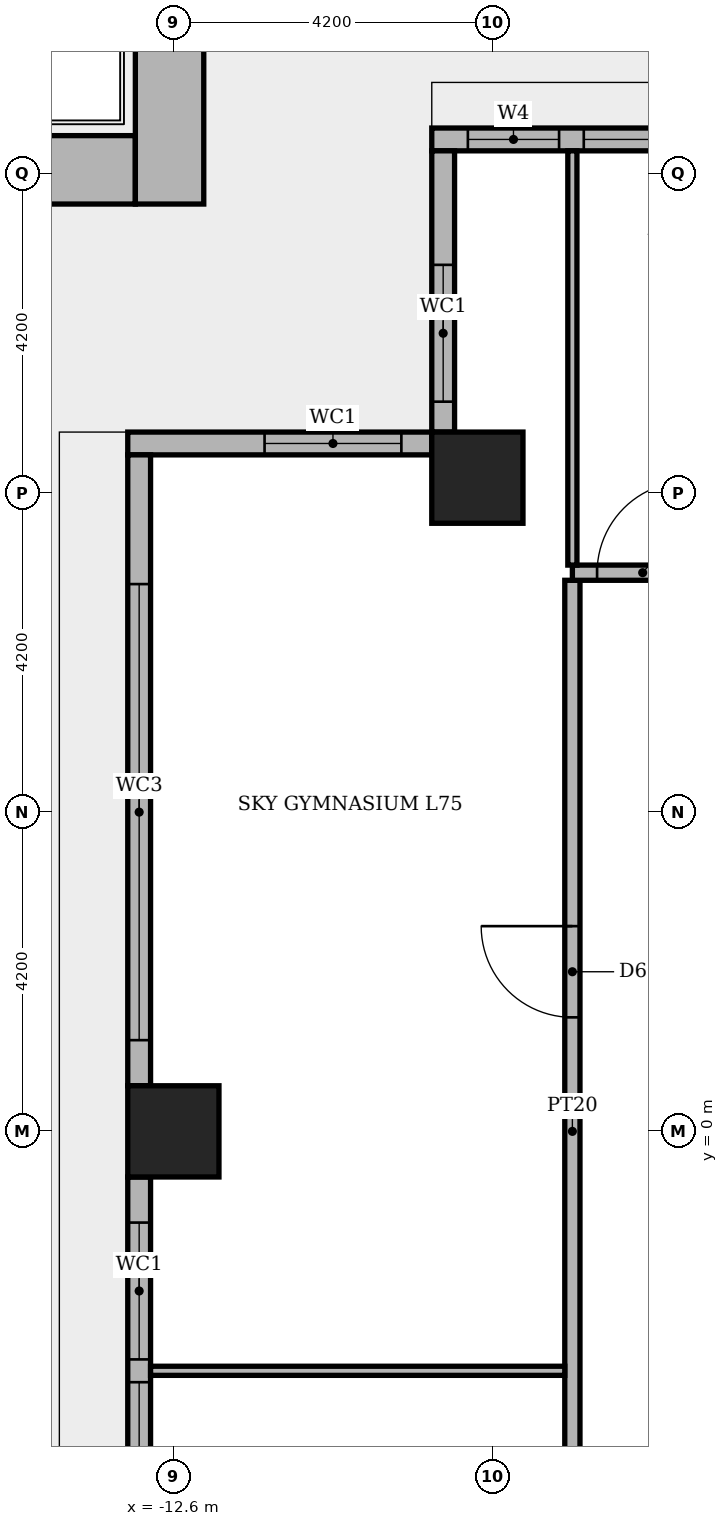
"""IFC4 building model, lengths in metres.
Left out: names, types, materials, properties, quantities, classifications, styles, units other than length and angle.
Written with IfcOpenShell. Run it as: python <this file> out.ifc"""

import sys

from ifc_helpers import new_model, si_unit, direction, frame, frame_2d, origin, origin_2d, place, context, subcontext, project, spatial, rectangle, extrude, element, fill, save


model = new_model("IFC4")
c1 = context("Model", 3, precision=1e-05, world=origin(), true_north=direction((0.0, 1.0)))
c2 = subcontext(c1, "Body", "Model", "MODEL_VIEW")
j1 = project(units=[si_unit("LENGTHUNIT", "METRE"), si_unit("PLANEANGLEUNIT", "RADIAN")], contexts=[c1])
p1 = place(None, origin())
s1 = spatial("IfcSite", under=j1, at=p1, CompositionType="ELEMENT")
p2 = place(p1, origin())
s2 = spatial("IfcBuilding", under=s1, at=p2, CompositionType="ELEMENT")
p3 = place(p2, frame((0.0, 0.0, 312.3)))
s3 = spatial("IfcBuildingStorey", under=s2, at=p3, CompositionType="ELEMENT", Elevation=312.3)
for number, where, z_axis, x_axis in (
    (1, (-12.6, 0.0, -0.35), (0.0, 0.0, 1.0), (1.0, 0.0, 0.0)),
    (2, (-8.6, 8.6, -0.35), (0.0, 0.0, 1.0), (1.0, 0.0, 0.0)),
):
    element("IfcColumn", number, at=place(p3, frame(where, z_axis=z_axis, x_axis=x_axis)), inside=s3, PredefinedType="COLUMN", context=c2, shape_type="SweptSolid", body=[
        extrude(rectangle(XDim=1.2, YDim=1.2, at=origin_2d()), origin(), (0.0, 0.0, 1.0), 4.25),
    ])
p4 = place(p3, frame((-0.6, 13.05, 0.0), z_axis=(0.0, 0.0, 1.0), x_axis=(-1.0, 0.0, 0.0)))
e3 = element("IfcWall", 3, at=p4, inside=s3, PredefinedType="STANDARD", context=c2, shape_type="SweptSolid", body=[
    extrude(rectangle(XDim=8.6, YDim=0.3, at=frame_2d((4.3, 0.0))), origin(), (0.0, 0.0, 1.0), 3.55),
])
p5 = place(p4, frame((0.6, 0.0, 0.6)))
e4 = element("IfcOpeningElement", 4, at=p5, cuts=e3, PredefinedType="OPENING", context=c2, shape_type="SweptSolid", body=[
    extrude(rectangle(XDim=1.8, YDim=2.4, at=frame_2d((0.9, 1.2))), frame((0.0, 0.16, 0.0), z_axis=(0.0, -1.0, 0.0), x_axis=(1.0, 0.0, 0.0)), (0.0, 0.0, 1.0), 0.32),
])
p6 = place(p4, frame((2.7, 0.0, 0.6)))
e5 = element("IfcOpeningElement", 5, at=p6, cuts=e3, PredefinedType="OPENING", context=c2, shape_type="SweptSolid", body=[
    extrude(rectangle(XDim=3.9, YDim=2.4, at=frame_2d((1.95, 1.2))), frame((0.0, 0.16, 0.0), z_axis=(0.0, -1.0, 0.0), x_axis=(1.0, 0.0, 0.0)), (0.0, 0.0, 1.0), 0.32),
])
p7 = place(p4, frame((6.925, 0.0, 0.9)))
e6 = element("IfcOpeningElement", 6, at=p7, cuts=e3, PredefinedType="OPENING", context=c2, shape_type="SweptSolid", body=[
    extrude(rectangle(XDim=1.2, YDim=2.1, at=frame_2d((0.6, 1.05))), frame((0.0, 0.16, 0.0), z_axis=(0.0, -1.0, 0.0), x_axis=(1.0, 0.0, 0.0)), (0.0, 0.0, 1.0), 0.32),
])
p8 = place(p3, frame((-9.05, 12.9, 0.0), z_axis=(0.0, 0.0, 1.0), x_axis=(0.0, -1.0, 0.0)))
e7 = element("IfcWall", 7, at=p8, inside=s3, PredefinedType="STANDARD", context=c2, shape_type="SweptSolid", body=[
    extrude(rectangle(XDim=3.7, YDim=0.3, at=frame_2d((1.85, 0.0))), origin(), (0.0, 0.0, 1.0), 3.55),
])
p9 = place(p8, frame((1.5, 0.0, 0.6)))
e8 = element("IfcOpeningElement", 8, at=p9, cuts=e7, PredefinedType="OPENING", context=c2, shape_type="SweptSolid", body=[
    extrude(rectangle(XDim=1.8, YDim=2.4, at=frame_2d((0.9, 1.2))), frame((0.0, 0.16, 0.0), z_axis=(0.0, -1.0, 0.0), x_axis=(1.0, 0.0, 0.0)), (0.0, 0.0, 1.0), 0.32),
])
p10 = place(p3, frame((-9.2, 9.05, 0.0), z_axis=(0.0, 0.0, 1.0), x_axis=(-1.0, 0.0, 0.0)))
e9 = element("IfcWall", 9, at=p10, inside=s3, PredefinedType="STANDARD", context=c2, shape_type="SweptSolid", body=[
    extrude(rectangle(XDim=4.0, YDim=0.3, at=frame_2d((2.0, 0.0))), origin(), (0.0, 0.0, 1.0), 3.55),
])
p11 = place(p10, frame((0.4, 0.0, 0.6)))
e10 = element("IfcOpeningElement", 10, at=p11, cuts=e9, PredefinedType="OPENING", context=c2, shape_type="SweptSolid", body=[
    extrude(rectangle(XDim=1.8, YDim=2.4, at=frame_2d((0.9, 1.2))), frame((0.0, 0.16, 0.0), z_axis=(0.0, -1.0, 0.0), x_axis=(1.0, 0.0, 0.0)), (0.0, 0.0, 1.0), 0.32),
])
p12 = place(p3, frame((-13.05, 8.9, 0.0), z_axis=(0.0, 0.0, 1.0), x_axis=(0.0, -1.0, 0.0)))
e11 = element("IfcWall", 11, at=p12, inside=s3, PredefinedType="STANDARD", context=c2, shape_type="SweptSolid", body=[
    extrude(rectangle(XDim=8.3, YDim=0.3, at=frame_2d((4.15, 0.0))), origin(), (0.0, 0.0, 1.0), 3.55),
])
p13 = place(p12, frame((1.7, 0.0, 0.6)))
e12 = element("IfcOpeningElement", 12, at=p13, cuts=e11, PredefinedType="OPENING", context=c2, shape_type="SweptSolid", body=[
    extrude(rectangle(XDim=6.0, YDim=2.4, at=frame_2d((3.0, 1.2))), frame((0.0, 0.16, 0.0), z_axis=(0.0, -1.0, 0.0), x_axis=(1.0, 0.0, 0.0)), (0.0, 0.0, 1.0), 0.32),
])
p14 = place(p3, frame((-13.05, -0.6, 0.0), z_axis=(0.0, 0.0, 1.0), x_axis=(0.0, -1.0, 0.0)))
e13 = element("IfcWall", 13, at=p14, inside=s3, PredefinedType="STANDARD", context=c2, shape_type="SweptSolid", body=[
    extrude(rectangle(XDim=8.6, YDim=0.3, at=frame_2d((4.3, 0.0))), origin(), (0.0, 0.0, 1.0), 3.55),
])
p15 = place(p14, frame((0.6, 0.0, 0.6)))
e14 = element("IfcOpeningElement", 14, at=p15, cuts=e13, PredefinedType="OPENING", context=c2, shape_type="SweptSolid", body=[
    extrude(rectangle(XDim=1.8, YDim=2.4, at=frame_2d((0.9, 1.2))), frame((0.0, 0.16, 0.0), z_axis=(0.0, -1.0, 0.0), x_axis=(1.0, 0.0, 0.0)), (0.0, 0.0, 1.0), 0.32),
])
p16 = place(p14, frame((2.7, 0.0, 0.6)))
e15 = element("IfcOpeningElement", 15, at=p16, cuts=e13, PredefinedType="OPENING", context=c2, shape_type="SweptSolid", body=[
    extrude(rectangle(XDim=3.9, YDim=2.4, at=frame_2d((1.95, 1.2))), frame((0.0, 0.16, 0.0), z_axis=(0.0, -1.0, 0.0), x_axis=(1.0, 0.0, 0.0)), (0.0, 0.0, 1.0), 0.32),
])
p17 = place(p14, frame((6.925, 0.0, 0.9)))
e16 = element("IfcOpeningElement", 16, at=p17, cuts=e13, PredefinedType="OPENING", context=c2, shape_type="SweptSolid", body=[
    extrude(rectangle(XDim=1.2, YDim=2.1, at=frame_2d((0.6, 1.05))), frame((0.0, 0.16, 0.0), z_axis=(0.0, -1.0, 0.0), x_axis=(1.0, 0.0, 0.0)), (0.0, 0.0, 1.0), 0.32),
])
p18 = place(p3, frame((-17.7, 12.65, 0.0), z_axis=(0.0, 0.0, 1.0), x_axis=(1.0, 0.0, 0.0)))
e17 = element("IfcWall", 17, at=p18, inside=s3, PredefinedType="MOVABLE", context=c2, shape_type="SweptSolid", body=[
    extrude(rectangle(XDim=4.6, YDim=0.9, at=frame_2d((2.3, 0.0))), origin(), (0.0, 0.0, 1.0), 0.6),
])
p19 = place(p3, frame((-12.65, 12.2, 0.0), z_axis=(0.0, 0.0, 1.0), x_axis=(0.0, 1.0, 0.0)))
e18 = element("IfcWall", 18, at=p19, inside=s3, PredefinedType="MOVABLE", context=c2, shape_type="SweptSolid", body=[
    extrude(rectangle(XDim=6.4, YDim=0.9, at=frame_2d((3.2, 0.0))), origin(), (0.0, 0.0, 1.0), 0.6),
])
p20 = place(p3, frame((-7.35, -7.25, 0.0), z_axis=(0.0, 0.0, 1.0), x_axis=(0.0, 1.0, 0.0)))
e19 = element("IfcWall", 19, at=p20, inside=s3, PredefinedType="PARTITIONING", context=c2, shape_type="SweptSolid", body=[
    extrude(rectangle(XDim=14.5, YDim=0.2, at=frame_2d((7.25, 0.0))), origin(), (0.0, 0.0, 1.0), 3.55),
])
p21 = place(p20, frame((8.75, 0.0, 0.0)))
e20 = element("IfcOpeningElement", 20, at=p21, cuts=e19, PredefinedType="OPENING", context=c2, shape_type="SweptSolid", body=[
    extrude(rectangle(XDim=1.2, YDim=2.1, at=frame_2d((0.6, 1.05))), frame((0.0, 0.11, 0.0), z_axis=(0.0, -1.0, 0.0), x_axis=(1.0, 0.0, 0.0)), (0.0, 0.0, 1.0), 0.22),
])
p22 = place(p20, frame((1.4, 0.0, 0.0)))
e21 = element("IfcOpeningElement", 21, at=p22, cuts=e19, PredefinedType="OPENING", context=c2, shape_type="SweptSolid", body=[
    extrude(rectangle(XDim=1.2, YDim=2.1, at=frame_2d((0.6, 1.05))), frame((0.0, 0.11, 0.0), z_axis=(0.0, -1.0, 0.0), x_axis=(1.0, 0.0, 0.0)), (0.0, 0.0, 1.0), 0.22),
])
p23 = place(p3, frame((-12.9, -3.15, 0.0), z_axis=(0.0, 0.0, 1.0), x_axis=(1.0, 0.0, 0.0)))
e22 = element("IfcWall", 22, at=p23, inside=s3, PredefinedType="PARTITIONING", context=c2, shape_type="SweptSolid", body=[
    extrude(rectangle(XDim=5.45, YDim=0.12, at=frame_2d((2.725, 0.0))), origin(), (0.0, 0.0, 1.0), 3.55),
])
p24 = place(p3, frame((-7.35, 7.35, 0.0), z_axis=(0.0, 0.0, 1.0), x_axis=(1.0, 0.0, 0.0)))
e23 = element("IfcWall", 23, at=p24, inside=s3, PredefinedType="PARTITIONING", context=c2, shape_type="SweptSolid", body=[
    extrude(rectangle(XDim=1.85, YDim=0.2, at=frame_2d((0.925, 0.0))), origin(), (0.0, 0.0, 1.0), 3.55),
])
p25 = place(p24, frame((0.325, 0.0, 0.0)))
e24 = element("IfcOpeningElement", 24, at=p25, cuts=e23, PredefinedType="OPENING", context=c2, shape_type="SweptSolid", body=[
    extrude(rectangle(XDim=1.2, YDim=2.1, at=frame_2d((0.6, 1.05))), frame((0.0, 0.11, 0.0), z_axis=(0.0, -1.0, 0.0), x_axis=(1.0, 0.0, 0.0)), (0.0, 0.0, 1.0), 0.22),
])
p26 = place(p3, frame((-7.35, 7.45, 0.0), z_axis=(0.0, 0.0, 1.0), x_axis=(0.0, 1.0, 0.0)))
e25 = element("IfcWall", 25, at=p26, inside=s3, PredefinedType="PARTITIONING", context=c2, shape_type="SweptSolid", body=[
    extrude(rectangle(XDim=5.45, YDim=0.12, at=frame_2d((2.725, 0.0))), origin(), (0.0, 0.0, 1.0), 3.55),
])
p27 = place(p6, origin())
e26 = element("IfcWindow", 26, at=p27, inside=s3, PartitioningType="SINGLE_PANEL", PredefinedType="WINDOW", context=c2, shape_type="SweptSolid", body=[
    extrude(rectangle(XDim=3.9, YDim=2.4, at=frame_2d((1.95, 1.2))), frame((0.0, 0.03, 0.0), z_axis=(0.0, -1.0, 0.0), x_axis=(1.0, 0.0, 0.0)), (0.0, 0.0, 1.0), 0.06),
])
fill(e5, e26)
p28 = place(p7, origin())
e27 = element("IfcWindow", 27, at=p28, inside=s3, PartitioningType="SINGLE_PANEL", PredefinedType="WINDOW", context=c2, shape_type="SweptSolid", body=[
    extrude(rectangle(XDim=1.2, YDim=2.1, at=frame_2d((0.6, 1.05))), frame((0.0, 0.03, 0.0), z_axis=(0.0, -1.0, 0.0), x_axis=(1.0, 0.0, 0.0)), (0.0, 0.0, 1.0), 0.06),
])
fill(e6, e27)
p29 = place(p9, origin())
e28 = element("IfcWindow", 28, at=p29, inside=s3, PartitioningType="SINGLE_PANEL", PredefinedType="WINDOW", context=c2, shape_type="SweptSolid", body=[
    extrude(rectangle(XDim=1.8, YDim=2.4, at=frame_2d((0.9, 1.2))), frame((0.0, 0.03, 0.0), z_axis=(0.0, -1.0, 0.0), x_axis=(1.0, 0.0, 0.0)), (0.0, 0.0, 1.0), 0.06),
])
fill(e8, e28)
p30 = place(p11, origin())
e29 = element("IfcWindow", 29, at=p30, inside=s3, PartitioningType="SINGLE_PANEL", PredefinedType="WINDOW", context=c2, shape_type="SweptSolid", body=[
    extrude(rectangle(XDim=1.8, YDim=2.4, at=frame_2d((0.9, 1.2))), frame((0.0, 0.03, 0.0), z_axis=(0.0, -1.0, 0.0), x_axis=(1.0, 0.0, 0.0)), (0.0, 0.0, 1.0), 0.06),
])
fill(e10, e29)
p31 = place(p13, origin())
e30 = element("IfcWindow", 30, at=p31, inside=s3, PartitioningType="SINGLE_PANEL", PredefinedType="WINDOW", context=c2, shape_type="SweptSolid", body=[
    extrude(rectangle(XDim=6.0, YDim=2.4, at=frame_2d((3.0, 1.2))), frame((0.0, 0.03, 0.0), z_axis=(0.0, -1.0, 0.0), x_axis=(1.0, 0.0, 0.0)), (0.0, 0.0, 1.0), 0.06),
])
fill(e12, e30)
p32 = place(p15, origin())
e31 = element("IfcWindow", 31, at=p32, inside=s3, PartitioningType="SINGLE_PANEL", PredefinedType="WINDOW", context=c2, shape_type="SweptSolid", body=[
    extrude(rectangle(XDim=1.8, YDim=2.4, at=frame_2d((0.9, 1.2))), frame((0.0, 0.03, 0.0), z_axis=(0.0, -1.0, 0.0), x_axis=(1.0, 0.0, 0.0)), (0.0, 0.0, 1.0), 0.06),
])
fill(e14, e31)
p33 = place(p16, origin())
e32 = element("IfcWindow", 32, at=p33, inside=s3, PartitioningType="SINGLE_PANEL", PredefinedType="WINDOW", context=c2, shape_type="SweptSolid", body=[
    extrude(rectangle(XDim=3.9, YDim=2.4, at=frame_2d((1.95, 1.2))), frame((0.0, 0.03, 0.0), z_axis=(0.0, -1.0, 0.0), x_axis=(1.0, 0.0, 0.0)), (0.0, 0.0, 1.0), 0.06),
])
fill(e15, e32)
p34 = place(p25, origin())
e33 = element("IfcDoor", 33, at=p34, inside=s3, OperationType="SINGLE_SWING_RIGHT", PredefinedType="DOOR", context=c2, shape_type="SweptSolid", body=[
    extrude(rectangle(XDim=1.2, YDim=2.1, at=frame_2d((0.6, 1.05))), frame((0.0, 0.025, 0.0), z_axis=(0.0, -1.0, 0.0), x_axis=(1.0, 0.0, 0.0)), (0.0, 0.0, 1.0), 0.05),
])
fill(e24, e33)
p35 = place(p21, origin())
e34 = element("IfcDoor", 34, at=p35, inside=s3, OperationType="SINGLE_SWING_RIGHT", PredefinedType="DOOR", context=c2, shape_type="SweptSolid", body=[
    extrude(rectangle(XDim=1.2, YDim=2.1, at=frame_2d((0.6, 1.05))), frame((0.0, 0.025, 0.0), z_axis=(0.0, -1.0, 0.0), x_axis=(1.0, 0.0, 0.0)), (0.0, 0.0, 1.0), 0.05),
])
fill(e20, e34)
save(model, sys.argv[1])
